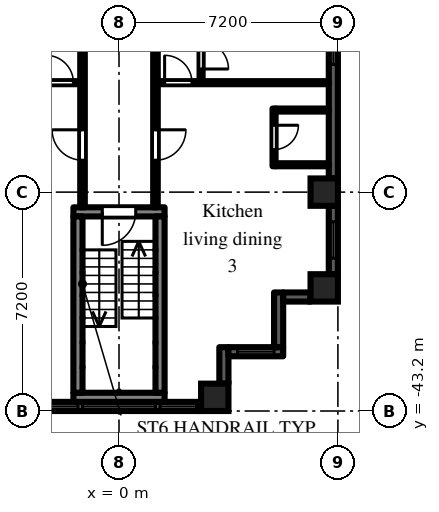
"""IFC4 building model, lengths in metres.
Left out: names, types, materials, properties, quantities, classifications, styles, units other than length and angle.
Written with IfcOpenShell. Run it as: python <this file> out.ifc"""

import sys

from ifc_helpers import new_model, si_unit, direction, frame, frame_2d, origin, origin_2d, place, context, subcontext, project, spatial, rectangle, extrude, element, fill, save


model = new_model("IFC4")
c1 = context("Model", 3, precision=1e-05, world=origin(), true_north=direction((0.0, 1.0)))
c2 = subcontext(c1, "Body", "Model", "MODEL_VIEW")
j1 = project(units=[si_unit("LENGTHUNIT", "METRE"), si_unit("PLANEANGLEUNIT", "RADIAN")], contexts=[c1])
p1 = place(None, origin())
s1 = spatial("IfcSite", under=j1, at=p1, CompositionType="ELEMENT")
p2 = place(p1, origin())
s2 = spatial("IfcBuilding", under=s1, at=p2, CompositionType="ELEMENT")
p3 = place(p2, frame((0.0, 0.0, 29.7)))
s3 = spatial("IfcBuildingStorey", under=s2, at=p3, CompositionType="ELEMENT", Elevation=29.7)
for number, where, z_axis, x_axis in (
    (1, (3.15, -42.75, 0.0), (0.0, 0.0, 1.0), (1.0, 0.0, 0.0)),
    (2, (6.75, -39.15, 0.0), (0.0, 0.0, 1.0), (1.0, 0.0, 0.0)),
    (3, (6.75, -36.0, 0.0), (0.0, 0.0, 1.0), (1.0, 0.0, 0.0)),
):
    element("IfcColumn", number, at=place(p3, frame(where, z_axis=z_axis, x_axis=x_axis)), inside=s3, PredefinedType="COLUMN", context=c2, shape_type="SweptSolid", body=[
        extrude(rectangle(XDim=0.9, YDim=0.9, at=origin_2d()), origin(), (0.0, 0.0, 1.0), 3.0),
    ])
p4 = place(p3, frame((-2.7, -43.05, 0.0), z_axis=(0.0, 0.0, 1.0), x_axis=(1.0, 0.0, 0.0)))
e4 = element("IfcWall", 4, at=p4, inside=s3, PredefinedType="SOLIDWALL", context=c2, shape_type="SweptSolid", body=[
    extrude(rectangle(XDim=5.4, YDim=0.3, at=frame_2d((2.7, 0.0))), origin(), (0.0, 0.0, 1.0), 2.1),
])
p5 = place(p4, frame((1.5, 0.0, 0.2)))
e5 = element("IfcOpeningElement", 5, at=p5, cuts=e4, PredefinedType="OPENING", context=c2, shape_type="SweptSolid", body=[
    extrude(rectangle(XDim=2.4, YDim=1.85, at=frame_2d((1.2, 0.925))), frame((0.0, 0.16, 0.0), z_axis=(0.0, -1.0, 0.0), x_axis=(1.0, 0.0, 0.0)), (0.0, 0.0, 1.0), 0.32),
])
p6 = place(p4, frame((0.15, 0.0, 0.2)))
e6 = element("IfcOpeningElement", 6, at=p6, cuts=e4, PredefinedType="OPENING", context=c2, shape_type="SweptSolid", body=[
    extrude(rectangle(XDim=1.2, YDim=1.85, at=frame_2d((0.6, 0.925))), frame((0.0, 0.16, 0.0), z_axis=(0.0, -1.0, 0.0), x_axis=(1.0, 0.0, 0.0)), (0.0, 0.0, 1.0), 0.32),
])
p7 = place(p4, frame((4.05, 0.0, 0.2)))
e7 = element("IfcOpeningElement", 7, at=p7, cuts=e4, PredefinedType="OPENING", context=c2, shape_type="SweptSolid", body=[
    extrude(rectangle(XDim=1.2, YDim=1.85, at=frame_2d((0.6, 0.925))), frame((0.0, 0.16, 0.0), z_axis=(0.0, -1.0, 0.0), x_axis=(1.0, 0.0, 0.0)), (0.0, 0.0, 1.0), 0.32),
])
p8 = place(p3, frame((3.45, -42.3, 0.0), z_axis=(0.0, 0.0, 1.0), x_axis=(0.0, 1.0, 0.0)))
e8 = element("IfcWall", 8, at=p8, inside=s3, PredefinedType="SOLIDWALL", context=c2, shape_type="SweptSolid", body=[
    extrude(rectangle(XDim=1.2, YDim=0.3, at=frame_2d((0.6, 0.0))), origin(), (0.0, 0.0, 1.0), 2.575),
])
p9 = place(p3, frame((3.6, -41.25, 0.0), z_axis=(0.0, 0.0, 1.0), x_axis=(1.0, 0.0, 0.0)))
e9 = element("IfcWall", 9, at=p9, inside=s3, PredefinedType="SOLIDWALL", context=c2, shape_type="SweptSolid", body=[
    extrude(rectangle(XDim=1.8, YDim=0.3, at=frame_2d((0.9, 0.0))), origin(), (0.0, 0.0, 1.0), 2.575),
])
p10 = place(p9, frame((0.3, 0.0, 0.2)))
e10 = element("IfcOpeningElement", 10, at=p10, cuts=e9, PredefinedType="OPENING", context=c2, shape_type="SweptSolid", body=[
    extrude(rectangle(XDim=1.2, YDim=1.85, at=frame_2d((0.6, 0.925))), frame((0.0, 0.16, 0.0), z_axis=(0.0, -1.0, 0.0), x_axis=(1.0, 0.0, 0.0)), (0.0, 0.0, 1.0), 0.32),
])
p11 = place(p3, frame((5.25, -41.1, 0.0), z_axis=(0.0, 0.0, 1.0), x_axis=(0.0, 1.0, 0.0)))
e11 = element("IfcWall", 11, at=p11, inside=s3, PredefinedType="SOLIDWALL", context=c2, shape_type="SweptSolid", body=[
    extrude(rectangle(XDim=1.8, YDim=0.3, at=frame_2d((0.9, 0.0))), origin(), (0.0, 0.0, 1.0), 2.575),
])
p12 = place(p3, frame((5.4, -39.45, 0.0), z_axis=(0.0, 0.0, 1.0), x_axis=(1.0, 0.0, 0.0)))
e12 = element("IfcWall", 12, at=p12, inside=s3, PredefinedType="SOLIDWALL", context=c2, shape_type="SweptSolid", body=[
    extrude(rectangle(XDim=0.9, YDim=0.3, at=frame_2d((0.45, 0.0))), origin(), (0.0, 0.0, 1.0), 2.575),
])
p13 = place(p3, frame((7.05, -38.7, 0.0), z_axis=(0.0, 0.0, 1.0), x_axis=(0.0, 1.0, 0.0)))
e13 = element("IfcWall", 13, at=p13, inside=s3, PredefinedType="SOLIDWALL", context=c2, shape_type="SweptSolid", body=[
    extrude(rectangle(XDim=2.25, YDim=0.3, at=frame_2d((1.125, 0.0))), origin(), (0.0, 0.0, 1.0), 2.1),
])
p14 = place(p13, frame((0.525, 0.0, 0.2)))
e14 = element("IfcOpeningElement", 14, at=p14, cuts=e13, PredefinedType="OPENING", context=c2, shape_type="SweptSolid", body=[
    extrude(rectangle(XDim=1.2, YDim=1.85, at=frame_2d((0.6, 0.925))), frame((0.0, 0.16, 0.0), z_axis=(0.0, -1.0, 0.0), x_axis=(1.0, 0.0, 0.0)), (0.0, 0.0, 1.0), 0.32),
])
p15 = place(p3, frame((7.05, -35.55, 0.0), z_axis=(0.0, 0.0, 1.0), x_axis=(0.0, 1.0, 0.0)))
e15 = element("IfcWall", 15, at=p15, inside=s3, PredefinedType="SOLIDWALL", context=c2, shape_type="SweptSolid", body=[
    extrude(rectangle(XDim=6.3, YDim=0.3, at=frame_2d((3.15, 0.0))), origin(), (0.0, 0.0, 1.0), 2.1),
])
p16 = place(p15, frame((3.75, 0.0, 0.2)))
e16 = element("IfcOpeningElement", 16, at=p16, cuts=e15, PredefinedType="OPENING", context=c2, shape_type="SweptSolid", body=[
    extrude(rectangle(XDim=2.4, YDim=1.85, at=frame_2d((1.2, 0.925))), frame((0.0, 0.16, 0.0), z_axis=(0.0, -1.0, 0.0), x_axis=(1.0, 0.0, 0.0)), (0.0, 0.0, 1.0), 0.32),
])
p17 = place(p3, frame((-1.5, -36.65, 0.0), z_axis=(0.0, 0.0, 1.0), x_axis=(1.0, 0.0, 0.0)))
e17 = element("IfcWall", 17, at=p17, inside=s3, PredefinedType="SHEAR", context=c2, shape_type="SweptSolid", body=[
    extrude(rectangle(XDim=3.0, YDim=0.3, at=frame_2d((1.5, 0.0))), origin(), (0.0, 0.0, 1.0), 2.575),
])
p18 = place(p17, frame((0.95, 0.0, 0.0)))
e18 = element("IfcOpeningElement", 18, at=p18, cuts=e17, PredefinedType="OPENING", context=c2, shape_type="SweptSolid", body=[
    extrude(rectangle(XDim=1.1, YDim=2.1, at=frame_2d((0.55, 1.05))), frame((0.0, 0.16, 0.0), z_axis=(0.0, -1.0, 0.0), x_axis=(1.0, 0.0, 0.0)), (0.0, 0.0, 1.0), 0.32),
])
p19 = place(p3, frame((-1.5, -42.75, 0.0), z_axis=(0.0, 0.0, 1.0), x_axis=(1.0, 0.0, 0.0)))
e19 = element("IfcWall", 19, at=p19, inside=s3, PredefinedType="SHEAR", context=c2, shape_type="SweptSolid", body=[
    extrude(rectangle(XDim=3.0, YDim=0.3, at=frame_2d((1.5, 0.0))), origin(), (0.0, 0.0, 1.0), 2.575),
])
for number, where, z_axis, x_axis in (
    (20, (-1.35, -36.8, 0.0), (0.0, 0.0, 1.0), (0.0, -1.0, 0.0)),
    (21, (1.35, -36.8, 0.0), (0.0, 0.0, 1.0), (0.0, -1.0, 0.0)),
):
    element("IfcWall", number, at=place(p3, frame(where, z_axis=z_axis, x_axis=x_axis)), inside=s3, PredefinedType="SHEAR", context=c2, shape_type="SweptSolid", body=[
        extrude(rectangle(XDim=5.8, YDim=0.3, at=frame_2d((2.9, 0.0))), origin(), (0.0, 0.0, 1.0), 2.575),
    ])
p20 = place(p3, frame((-6.9, -32.4, 0.0), z_axis=(0.0, 0.0, 1.0), x_axis=(1.0, 0.0, 0.0)))
e22 = element("IfcWall", 22, at=p20, inside=s3, PredefinedType="PARTITIONING", context=c2, shape_type="SweptSolid", body=[
    extrude(rectangle(XDim=5.625, YDim=0.1, at=frame_2d((2.812, 0.0))), origin(), (0.0, 0.0, 1.0), 2.575),
])
p21 = place(p20, frame((4.5, 0.0, 0.0)))
e23 = element("IfcOpeningElement", 23, at=p21, cuts=e22, PredefinedType="OPENING", context=c2, shape_type="SweptSolid", body=[
    extrude(rectangle(XDim=0.9, YDim=2.1, at=frame_2d((0.45, 1.05))), frame((0.0, 0.06, 0.0), z_axis=(0.0, -1.0, 0.0), x_axis=(1.0, 0.0, 0.0)), (0.0, 0.0, 1.0), 0.12),
])
p22 = place(p3, frame((-1.2, -36.5, 0.0), z_axis=(0.0, 0.0, 1.0), x_axis=(0.0, 1.0, 0.0)))
e24 = element("IfcWall", 24, at=p22, inside=s3, PredefinedType="PARTITIONING", context=c2, shape_type="SweptSolid", body=[
    extrude(rectangle(XDim=35.375, YDim=0.15, at=frame_2d((17.688, 0.0))), origin(), (0.0, 0.0, 1.0), 2.575),
])
p23 = place(p22, frame((33.65, 0.0, 0.0)))
e25 = element("IfcOpeningElement", 25, at=p23, cuts=e24, PredefinedType="OPENING", context=c2, shape_type="SweptSolid", body=[
    extrude(rectangle(XDim=0.9, YDim=2.1, at=frame_2d((0.45, 1.05))), frame((0.0, 0.085, 0.0), z_axis=(0.0, -1.0, 0.0), x_axis=(1.0, 0.0, 0.0)), (0.0, 0.0, 1.0), 0.17),
])
p24 = place(p22, frame((30.65, 0.0, 0.0)))
e26 = element("IfcOpeningElement", 26, at=p24, cuts=e24, PredefinedType="OPENING", context=c2, shape_type="SweptSolid", body=[
    extrude(rectangle(XDim=0.9, YDim=2.1, at=frame_2d((0.45, 1.05))), frame((0.0, 0.085, 0.0), z_axis=(0.0, -1.0, 0.0), x_axis=(1.0, 0.0, 0.0)), (0.0, 0.0, 1.0), 0.17),
])
p25 = place(p22, frame((27.05, 0.0, 0.0)))
e27 = element("IfcOpeningElement", 27, at=p25, cuts=e24, PredefinedType="OPENING", context=c2, shape_type="SweptSolid", body=[
    extrude(rectangle(XDim=0.9, YDim=2.1, at=frame_2d((0.45, 1.05))), frame((0.0, 0.085, 0.0), z_axis=(0.0, -1.0, 0.0), x_axis=(1.0, 0.0, 0.0)), (0.0, 0.0, 1.0), 0.17),
])
p26 = place(p22, frame((20.9, 0.0, 0.0)))
e28 = element("IfcOpeningElement", 28, at=p26, cuts=e24, PredefinedType="OPENING", context=c2, shape_type="SweptSolid", body=[
    extrude(rectangle(XDim=1.0, YDim=2.1, at=frame_2d((0.5, 1.05))), frame((0.0, 0.085, 0.0), z_axis=(0.0, -1.0, 0.0), x_axis=(1.0, 0.0, 0.0)), (0.0, 0.0, 1.0), 0.17),
])
p27 = place(p22, frame((1.55, 0.0, 0.0)))
e29 = element("IfcOpeningElement", 29, at=p27, cuts=e24, PredefinedType="OPENING", context=c2, shape_type="SweptSolid", body=[
    extrude(rectangle(XDim=1.0, YDim=2.1, at=frame_2d((0.5, 1.05))), frame((0.0, 0.085, 0.0), z_axis=(0.0, -1.0, 0.0), x_axis=(1.0, 0.0, 0.0)), (0.0, 0.0, 1.0), 0.17),
])
p28 = place(p3, frame((1.2, -36.5, 0.0), z_axis=(0.0, 0.0, 1.0), x_axis=(0.0, 1.0, 0.0)))
e30 = element("IfcWall", 30, at=p28, inside=s3, PredefinedType="PARTITIONING", context=c2, shape_type="SweptSolid", body=[
    extrude(rectangle(XDim=35.375, YDim=0.15, at=frame_2d((17.688, 0.0))), origin(), (0.0, 0.0, 1.0), 2.575),
])
p29 = place(p28, frame((31.85, 0.0, 0.0)))
e31 = element("IfcOpeningElement", 31, at=p29, cuts=e30, PredefinedType="OPENING", context=c2, shape_type="SweptSolid", body=[
    extrude(rectangle(XDim=0.9, YDim=2.1, at=frame_2d((0.45, 1.05))), frame((0.0, 0.085, 0.0), z_axis=(0.0, -1.0, 0.0), x_axis=(1.0, 0.0, 0.0)), (0.0, 0.0, 1.0), 0.17),
])
p30 = place(p28, frame((23.45, 0.0, 0.0)))
e32 = element("IfcOpeningElement", 32, at=p30, cuts=e30, PredefinedType="OPENING", context=c2, shape_type="SweptSolid", body=[
    extrude(rectangle(XDim=0.9, YDim=2.1, at=frame_2d((0.45, 1.05))), frame((0.0, 0.085, 0.0), z_axis=(0.0, -1.0, 0.0), x_axis=(1.0, 0.0, 0.0)), (0.0, 0.0, 1.0), 0.17),
])
p31 = place(p28, frame((20.5, 0.0, 0.0)))
e33 = element("IfcOpeningElement", 33, at=p31, cuts=e30, PredefinedType="OPENING", context=c2, shape_type="SweptSolid", body=[
    extrude(rectangle(XDim=1.0, YDim=2.1, at=frame_2d((0.5, 1.05))), frame((0.0, 0.085, 0.0), z_axis=(0.0, -1.0, 0.0), x_axis=(1.0, 0.0, 0.0)), (0.0, 0.0, 1.0), 0.17),
])
p32 = place(p28, frame((1.55, 0.0, 0.0)))
e34 = element("IfcOpeningElement", 34, at=p32, cuts=e30, PredefinedType="OPENING", context=c2, shape_type="SweptSolid", body=[
    extrude(rectangle(XDim=1.0, YDim=2.1, at=frame_2d((0.5, 1.05))), frame((0.0, 0.085, 0.0), z_axis=(0.0, -1.0, 0.0), x_axis=(1.0, 0.0, 0.0)), (0.0, 0.0, 1.0), 0.17),
])
p33 = place(p3, frame((1.275, -32.4, 0.0), z_axis=(0.0, 0.0, 1.0), x_axis=(1.0, 0.0, 0.0)))
e35 = element("IfcWall", 35, at=p33, inside=s3, PredefinedType="PARTITIONING", context=c2, shape_type="SweptSolid", body=[
    extrude(rectangle(XDim=5.625, YDim=0.1, at=frame_2d((2.812, 0.0))), origin(), (0.0, 0.0, 1.0), 2.575),
])
p34 = place(p33, frame((0.225, 0.0, 0.0)))
e36 = element("IfcOpeningElement", 36, at=p34, cuts=e35, PredefinedType="OPENING", context=c2, shape_type="SweptSolid", body=[
    extrude(rectangle(XDim=0.9, YDim=2.1, at=frame_2d((0.45, 1.05))), frame((0.0, 0.06, 0.0), z_axis=(0.0, -1.0, 0.0), x_axis=(1.0, 0.0, 0.0)), (0.0, 0.0, 1.0), 0.12),
])
p35 = place(p3, frame((2.7, -32.35, 0.0), z_axis=(0.0, 0.0, 1.0), x_axis=(0.0, 1.0, 0.0)))
e37 = element("IfcWall", 37, at=p35, inside=s3, PredefinedType="PARTITIONING", context=c2, shape_type="SweptSolid", body=[
    extrude(rectangle(XDim=14.25, YDim=0.1, at=frame_2d((7.125, 0.0))), origin(), (0.0, 0.0, 1.0), 2.575),
])
p36 = place(p35, frame((0.4, 0.0, 0.0)))
e38 = element("IfcOpeningElement", 38, at=p36, cuts=e37, PredefinedType="OPENING", context=c2, shape_type="SweptSolid", body=[
    extrude(rectangle(XDim=0.9, YDim=2.1, at=frame_2d((0.45, 1.05))), frame((0.0, 0.06, 0.0), z_axis=(0.0, -1.0, 0.0), x_axis=(1.0, 0.0, 0.0)), (0.0, 0.0, 1.0), 0.12),
])
p37 = place(p35, frame((5.8, 0.0, 0.0)))
e39 = element("IfcOpeningElement", 39, at=p37, cuts=e37, PredefinedType="OPENING", context=c2, shape_type="SweptSolid", body=[
    extrude(rectangle(XDim=0.9, YDim=2.1, at=frame_2d((0.45, 1.05))), frame((0.0, 0.06, 0.0), z_axis=(0.0, -1.0, 0.0), x_axis=(1.0, 0.0, 0.0)), (0.0, 0.0, 1.0), 0.12),
])
p38 = place(p35, frame((7.6, 0.0, 0.0)))
e40 = element("IfcOpeningElement", 40, at=p38, cuts=e37, PredefinedType="OPENING", context=c2, shape_type="SweptSolid", body=[
    extrude(rectangle(XDim=0.9, YDim=2.1, at=frame_2d((0.45, 1.05))), frame((0.0, 0.06, 0.0), z_axis=(0.0, -1.0, 0.0), x_axis=(1.0, 0.0, 0.0)), (0.0, 0.0, 1.0), 0.12),
])
p39 = place(p35, frame((13.0, 0.0, 0.0)))
e41 = element("IfcOpeningElement", 41, at=p39, cuts=e37, PredefinedType="OPENING", context=c2, shape_type="SweptSolid", body=[
    extrude(rectangle(XDim=0.9, YDim=2.1, at=frame_2d((0.45, 1.05))), frame((0.0, 0.06, 0.0), z_axis=(0.0, -1.0, 0.0), x_axis=(1.0, 0.0, 0.0)), (0.0, 0.0, 1.0), 0.12),
])
p40 = place(p3, frame((5.1, -35.15, 0.0), z_axis=(0.0, 0.0, 1.0), x_axis=(0.0, 1.0, 0.0)))
e42 = element("IfcWall", 42, at=p40, inside=s3, PredefinedType="PARTITIONING", context=c2, shape_type="SweptSolid", body=[
    extrude(rectangle(XDim=1.9, YDim=0.1, at=frame_2d((0.95, 0.0))), origin(), (0.0, 0.0, 1.0), 2.575),
])
p41 = place(p40, frame((0.55, 0.0, 0.0)))
e43 = element("IfcOpeningElement", 43, at=p41, cuts=e42, PredefinedType="OPENING", context=c2, shape_type="SweptSolid", body=[
    extrude(rectangle(XDim=0.8, YDim=2.1, at=frame_2d((0.4, 1.05))), frame((0.0, 0.06, 0.0), z_axis=(0.0, -1.0, 0.0), x_axis=(1.0, 0.0, 0.0)), (0.0, 0.0, 1.0), 0.12),
])
for number, where, z_axis, x_axis in (
    (44, (5.15, -35.1, 0.0), (0.0, 0.0, 1.0), (1.0, 0.0, 0.0)),
    (45, (5.15, -33.3, 0.0), (0.0, 0.0, 1.0), (1.0, 0.0, 0.0)),
):
    element("IfcWall", number, at=place(p3, frame(where, z_axis=z_axis, x_axis=x_axis)), inside=s3, PredefinedType="PARTITIONING", context=c2, shape_type="SweptSolid", body=[
        extrude(rectangle(XDim=1.75, YDim=0.1, at=frame_2d((0.875, 0.0))), origin(), (0.0, 0.0, 1.0), 2.575),
    ])
p42 = place(p5, origin())
e46 = element("IfcWindow", 46, at=p42, inside=s3, PartitioningType="SINGLE_PANEL", PredefinedType="WINDOW", context=c2, shape_type="SweptSolid", body=[
    extrude(rectangle(XDim=2.4, YDim=1.85, at=frame_2d((1.2, 0.925))), frame((0.0, 0.03, 0.0), z_axis=(0.0, -1.0, 0.0), x_axis=(1.0, 0.0, 0.0)), (0.0, 0.0, 1.0), 0.06),
])
fill(e5, e46)
p43 = place(p6, origin())
e47 = element("IfcWindow", 47, at=p43, inside=s3, PartitioningType="SINGLE_PANEL", PredefinedType="WINDOW", context=c2, shape_type="SweptSolid", body=[
    extrude(rectangle(XDim=1.2, YDim=1.85, at=frame_2d((0.6, 0.925))), frame((0.0, 0.03, 0.0), z_axis=(0.0, -1.0, 0.0), x_axis=(1.0, 0.0, 0.0)), (0.0, 0.0, 1.0), 0.06),
])
fill(e6, e47)
p44 = place(p7, origin())
e48 = element("IfcWindow", 48, at=p44, inside=s3, PartitioningType="SINGLE_PANEL", PredefinedType="WINDOW", context=c2, shape_type="SweptSolid", body=[
    extrude(rectangle(XDim=1.2, YDim=1.85, at=frame_2d((0.6, 0.925))), frame((0.0, 0.03, 0.0), z_axis=(0.0, -1.0, 0.0), x_axis=(1.0, 0.0, 0.0)), (0.0, 0.0, 1.0), 0.06),
])
fill(e7, e48)
p45 = place(p10, origin())
e49 = element("IfcWindow", 49, at=p45, inside=s3, PartitioningType="SINGLE_PANEL", PredefinedType="WINDOW", context=c2, shape_type="SweptSolid", body=[
    extrude(rectangle(XDim=1.2, YDim=1.85, at=frame_2d((0.6, 0.925))), frame((0.0, 0.03, 0.0), z_axis=(0.0, -1.0, 0.0), x_axis=(1.0, 0.0, 0.0)), (0.0, 0.0, 1.0), 0.06),
])
fill(e10, e49)
p46 = place(p14, origin())
e50 = element("IfcWindow", 50, at=p46, inside=s3, PartitioningType="SINGLE_PANEL", PredefinedType="WINDOW", context=c2, shape_type="SweptSolid", body=[
    extrude(rectangle(XDim=1.2, YDim=1.85, at=frame_2d((0.6, 0.925))), frame((0.0, 0.03, 0.0), z_axis=(0.0, -1.0, 0.0), x_axis=(1.0, 0.0, 0.0)), (0.0, 0.0, 1.0), 0.06),
])
fill(e14, e50)
p47 = place(p16, origin())
e51 = element("IfcWindow", 51, at=p47, inside=s3, PartitioningType="SINGLE_PANEL", PredefinedType="WINDOW", context=c2, shape_type="SweptSolid", body=[
    extrude(rectangle(XDim=2.4, YDim=1.85, at=frame_2d((1.2, 0.925))), frame((0.0, 0.03, 0.0), z_axis=(0.0, -1.0, 0.0), x_axis=(1.0, 0.0, 0.0)), (0.0, 0.0, 1.0), 0.06),
])
fill(e16, e51)
p48 = place(p18, frame((1.1, 0.0, 0.0), z_axis=(0.0, 0.0, 1.0), x_axis=(-1.0, 0.0, 0.0)))
e52 = element("IfcDoor", 52, at=p48, inside=s3, OperationType="SINGLE_SWING_RIGHT", PredefinedType="DOOR", context=c2, shape_type="SweptSolid", body=[
    extrude(rectangle(XDim=1.1, YDim=2.1, at=frame_2d((0.55, 1.05))), frame((0.0, 0.025, 0.0), z_axis=(0.0, -1.0, 0.0), x_axis=(1.0, 0.0, 0.0)), (0.0, 0.0, 1.0), 0.05),
])
fill(e18, e52)
p49 = place(p41, frame((0.8, 0.0, 0.0), z_axis=(0.0, 0.0, 1.0), x_axis=(-1.0, 0.0, 0.0)))
e53 = element("IfcDoor", 53, at=p49, inside=s3, OperationType="SINGLE_SWING_LEFT", PredefinedType="DOOR", context=c2, shape_type="SweptSolid", body=[
    extrude(rectangle(XDim=0.8, YDim=2.1, at=frame_2d((0.4, 1.05))), frame((0.0, 0.025, 0.0), z_axis=(0.0, -1.0, 0.0), x_axis=(1.0, 0.0, 0.0)), (0.0, 0.0, 1.0), 0.05),
])
fill(e43, e53)
p50 = place(p32, frame((1.0, 0.0, 0.0), z_axis=(0.0, 0.0, 1.0), x_axis=(-1.0, 0.0, 0.0)))
e54 = element("IfcDoor", 54, at=p50, inside=s3, OperationType="SINGLE_SWING_LEFT", PredefinedType="DOOR", context=c2, shape_type="SweptSolid", body=[
    extrude(rectangle(XDim=1.0, YDim=2.1, at=frame_2d((0.5, 1.05))), frame((0.0, 0.025, 0.0), z_axis=(0.0, -1.0, 0.0), x_axis=(1.0, 0.0, 0.0)), (0.0, 0.0, 1.0), 0.05),
])
fill(e34, e54)
p51 = place(p34, origin())
e55 = element("IfcDoor", 55, at=p51, inside=s3, OperationType="SINGLE_SWING_LEFT", PredefinedType="DOOR", context=c2, shape_type="SweptSolid", body=[
    extrude(rectangle(XDim=0.9, YDim=2.1, at=frame_2d((0.45, 1.05))), frame((0.0, 0.025, 0.0), z_axis=(0.0, -1.0, 0.0), x_axis=(1.0, 0.0, 0.0)), (0.0, 0.0, 1.0), 0.05),
])
fill(e36, e55)
p52 = place(p36, frame((0.9, 0.0, 0.0), z_axis=(0.0, 0.0, 1.0), x_axis=(-1.0, 0.0, 0.0)))
e56 = element("IfcDoor", 56, at=p52, inside=s3, OperationType="SINGLE_SWING_RIGHT", PredefinedType="DOOR", context=c2, shape_type="SweptSolid", body=[
    extrude(rectangle(XDim=0.9, YDim=2.1, at=frame_2d((0.45, 1.05))), frame((0.0, 0.025, 0.0), z_axis=(0.0, -1.0, 0.0), x_axis=(1.0, 0.0, 0.0)), (0.0, 0.0, 1.0), 0.05),
])
fill(e38, e56)
p53 = place(p27, origin())
e57 = element("IfcDoor", 57, at=p53, inside=s3, OperationType="SINGLE_SWING_RIGHT", PredefinedType="DOOR", context=c2, shape_type="SweptSolid", body=[
    extrude(rectangle(XDim=1.0, YDim=2.1, at=frame_2d((0.5, 1.05))), frame((0.0, 0.025, 0.0), z_axis=(0.0, -1.0, 0.0), x_axis=(1.0, 0.0, 0.0)), (0.0, 0.0, 1.0), 0.05),
])
fill(e29, e57)
p54 = place(p21, origin())
e58 = element("IfcDoor", 58, at=p54, inside=s3, OperationType="SINGLE_SWING_LEFT", PredefinedType="DOOR", context=c2, shape_type="SweptSolid", body=[
    extrude(rectangle(XDim=0.9, YDim=2.1, at=frame_2d((0.45, 1.05))), frame((0.0, 0.025, 0.0), z_axis=(0.0, -1.0, 0.0), x_axis=(1.0, 0.0, 0.0)), (0.0, 0.0, 1.0), 0.05),
])
fill(e23, e58)
save(model, sys.argv[1])
